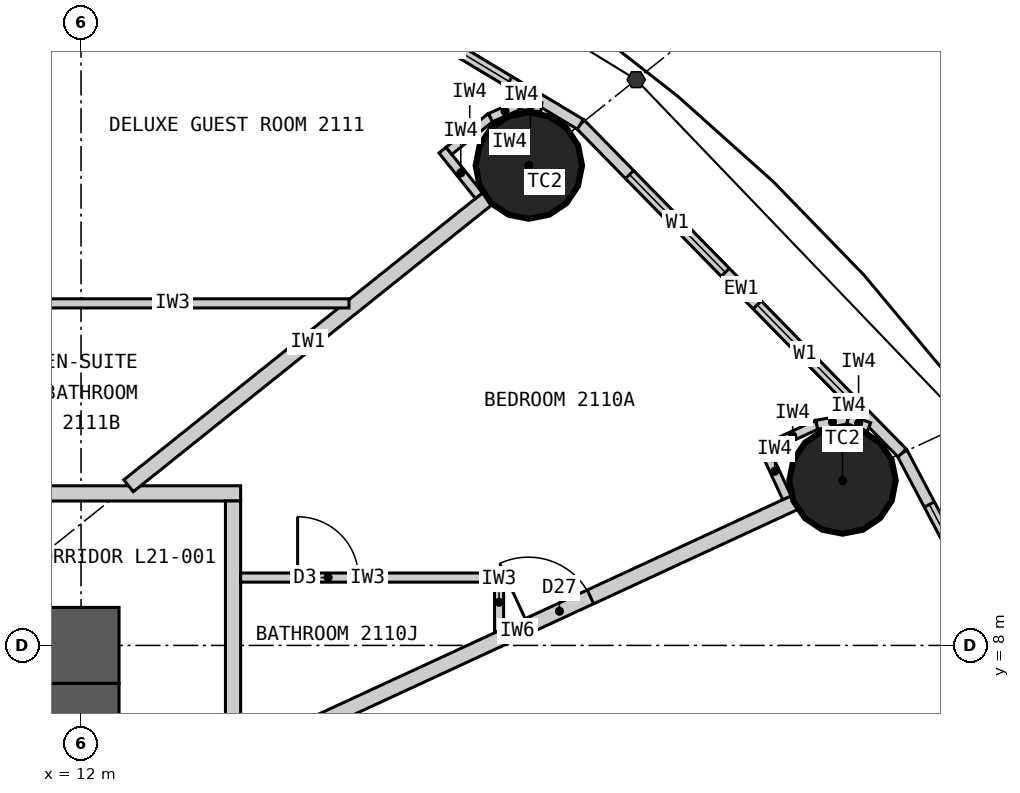
"""IFC4 building model, lengths in metres.
Left out: names, types, materials, properties, quantities, classifications, styles, units other than length and angle.
Written with IfcOpenShell. Run it as: python <this file> out.ifc"""

import sys

from ifc_helpers import new_model, si_unit, direction, frame, frame_2d, origin, origin_2d, place, context, subcontext, project, spatial, rectangle, circle, extrude, element, fill, save


model = new_model("IFC4")
c1 = context("Model", 3, precision=1e-05, world=origin(), true_north=direction((0.0, 1.0)))
c2 = subcontext(c1, "Body", "Model", "MODEL_VIEW")
j1 = project(units=[si_unit("LENGTHUNIT", "METRE"), si_unit("PLANEANGLEUNIT", "RADIAN")], contexts=[c1])
p1 = place(None, origin())
s1 = spatial("IfcSite", under=j1, at=p1, CompositionType="ELEMENT")
p2 = place(p1, origin())
s2 = spatial("IfcBuilding", under=s1, at=p2, CompositionType="ELEMENT")
p3 = place(p2, frame((0.0, 0.0, 83.7)))
s3 = spatial("IfcBuildingStorey", under=s2, at=p3, CompositionType="ELEMENT", Elevation=83.7)
for number, where, z_axis, x_axis in (
    (1, (22.019, 10.17, 0.0), (0.0, 0.0, 1.0), (1.0, 0.0, 0.0)),
    (2, (17.892, 14.313, 0.0), (0.0, 0.0, 1.0), (1.0, 0.0, 0.0)),
):
    element("IfcColumn", number, at=place(p3, frame(where, z_axis=z_axis, x_axis=x_axis)), inside=s3, PredefinedType="COLUMN", context=c2, shape_type="SweptSolid", body=[
        extrude(circle(Radius=0.7, at=origin_2d()), origin(), (0.0, 0.0, 1.0), 3.3),
    ])
p4 = place(p3, frame((-12.5, 8.0, 0.0), z_axis=(0.0, 0.0, 1.0), x_axis=(1.0, 0.0, 0.0)))
e3 = element("IfcWall", 3, at=p4, inside=s3, PredefinedType="SHEAR", context=c2, shape_type="SweptSolid", body=[
    extrude(rectangle(XDim=25.0, YDim=1.0, at=frame_2d((12.5, 0.0))), origin(), (0.0, 0.0, 1.0), 3.3),
])
p5 = place(p4, frame((11.2, 0.0, 0.0)))
e4 = element("IfcOpeningElement", 4, at=p5, cuts=e3, PredefinedType="OPENING", context=c2, shape_type="SweptSolid", body=[
    extrude(rectangle(XDim=1.2, YDim=2.2, at=frame_2d((0.6, 1.1))), frame((0.0, 0.51, 0.0), z_axis=(0.0, -1.0, 0.0), x_axis=(1.0, 0.0, 0.0)), (0.0, 0.0, 1.0), 1.02),
])
p6 = place(p4, frame((18.8, 0.0, 0.0)))
e5 = element("IfcOpeningElement", 5, at=p6, cuts=e3, PredefinedType="OPENING", context=c2, shape_type="SweptSolid", body=[
    extrude(rectangle(XDim=0.9, YDim=2.2, at=frame_2d((0.45, 1.1))), frame((0.0, 0.51, 0.0), z_axis=(0.0, -1.0, 0.0), x_axis=(1.0, 0.0, 0.0)), (0.0, 0.0, 1.0), 1.02),
])
p7 = place(p3, frame((12.0, -7.5, 0.0), z_axis=(0.0, 0.0, 1.0), x_axis=(0.0, 1.0, 0.0)))
e6 = element("IfcWall", 6, at=p7, inside=s3, PredefinedType="SHEAR", context=c2, shape_type="SweptSolid", body=[
    extrude(rectangle(XDim=15.0, YDim=1.0, at=frame_2d((7.5, 0.0))), origin(), (0.0, 0.0, 1.0), 3.3),
])
p8 = place(p7, frame((6.6, 0.0, 0.0)))
e7 = element("IfcOpeningElement", 7, at=p8, cuts=e6, PredefinedType="OPENING", context=c2, shape_type="SweptSolid", body=[
    extrude(rectangle(XDim=1.8, YDim=2.2, at=frame_2d((0.9, 1.1))), frame((0.0, 0.51, 0.0), z_axis=(0.0, -1.0, 0.0), x_axis=(1.0, 0.0, 0.0)), (0.0, 0.0, 1.0), 1.02),
])
p9 = place(p3, frame((25.482, 5.462, 0.0), z_axis=(0.0, 0.0, 1.0), x_axis=(-0.467296867008, 0.884100468321, 0.0)))
e8 = element("IfcWall", 8, at=p9, inside=s3, PredefinedType="ELEMENTEDWALL", context=c2, shape_type="SweptSolid", body=[
    extrude(rectangle(XDim=5.734, YDim=0.15, at=frame_2d((2.867, 0.0))), origin(), (0.0, 0.0, 1.0), 3.12),
])
p10 = place(p9, frame((0.767, 0.0, 0.9)))
e9 = element("IfcOpeningElement", 9, at=p10, cuts=e8, PredefinedType="OPENING", context=c2, shape_type="SweptSolid", body=[
    extrude(rectangle(XDim=1.8, YDim=1.9, at=frame_2d((0.9, 0.95))), frame((0.0, 0.085, 0.0), z_axis=(0.0, -1.0, 0.0), x_axis=(1.0, 0.0, 0.0)), (0.0, 0.0, 1.0), 0.17),
])
p11 = place(p9, frame((3.167, 0.0, 0.9)))
e10 = element("IfcOpeningElement", 10, at=p11, cuts=e8, PredefinedType="OPENING", context=c2, shape_type="SweptSolid", body=[
    extrude(rectangle(XDim=1.8, YDim=1.9, at=frame_2d((0.9, 0.95))), frame((0.0, 0.085, 0.0), z_axis=(0.0, -1.0, 0.0), x_axis=(1.0, 0.0, 0.0)), (0.0, 0.0, 1.0), 0.17),
])
p12 = place(p3, frame((22.803, 10.532, 0.0), z_axis=(0.0, 0.0, 1.0), x_axis=(-0.699602905915, 0.714531856557, 0.0)))
e11 = element("IfcWall", 11, at=p12, inside=s3, PredefinedType="ELEMENTEDWALL", context=c2, shape_type="SweptSolid", body=[
    extrude(rectangle(XDim=6.051, YDim=0.15, at=frame_2d((3.025, 0.0))), origin(), (0.0, 0.0, 1.0), 3.12),
])
p13 = place(p12, frame((0.926, 0.0, 0.9)))
e12 = element("IfcOpeningElement", 12, at=p13, cuts=e11, PredefinedType="OPENING", context=c2, shape_type="SweptSolid", body=[
    extrude(rectangle(XDim=1.8, YDim=1.9, at=frame_2d((0.9, 0.95))), frame((0.0, 0.085, 0.0), z_axis=(0.0, -1.0, 0.0), x_axis=(1.0, 0.0, 0.0)), (0.0, 0.0, 1.0), 0.17),
])
p14 = place(p12, frame((3.325, 0.0, 0.9)))
e13 = element("IfcOpeningElement", 13, at=p14, cuts=e11, PredefinedType="OPENING", context=c2, shape_type="SweptSolid", body=[
    extrude(rectangle(XDim=1.8, YDim=1.9, at=frame_2d((0.9, 0.95))), frame((0.0, 0.085, 0.0), z_axis=(0.0, -1.0, 0.0), x_axis=(1.0, 0.0, 0.0)), (0.0, 0.0, 1.0), 0.17),
])
p15 = place(p3, frame((18.57, 14.856, 0.0), z_axis=(0.0, 0.0, 1.0), x_axis=(-0.856983180864, 0.515344377787, 0.0)))
e14 = element("IfcWall", 14, at=p15, inside=s3, PredefinedType="ELEMENTEDWALL", context=c2, shape_type="SweptSolid", body=[
    extrude(rectangle(XDim=6.386, YDim=0.15, at=frame_2d((3.193, 0.0))), origin(), (0.0, 0.0, 1.0), 3.12),
])
p16 = place(p15, frame((1.093, 0.0, 0.9)))
e15 = element("IfcOpeningElement", 15, at=p16, cuts=e14, PredefinedType="OPENING", context=c2, shape_type="SweptSolid", body=[
    extrude(rectangle(XDim=1.8, YDim=1.9, at=frame_2d((0.9, 0.95))), frame((0.0, 0.085, 0.0), z_axis=(0.0, -1.0, 0.0), x_axis=(1.0, 0.0, 0.0)), (0.0, 0.0, 1.0), 0.17),
])
p17 = place(p15, frame((3.493, 0.0, 0.9)))
e16 = element("IfcOpeningElement", 16, at=p17, cuts=e14, PredefinedType="OPENING", context=c2, shape_type="SweptSolid", body=[
    extrude(rectangle(XDim=1.8, YDim=1.9, at=frame_2d((0.9, 0.95))), frame((0.0, 0.085, 0.0), z_axis=(0.0, -1.0, 0.0), x_axis=(1.0, 0.0, 0.0)), (0.0, 0.0, 1.0), 0.17),
])
p18 = place(p3, frame((-14.1, 10.0, 0.0), z_axis=(0.0, 0.0, 1.0), x_axis=(1.0, 0.0, 0.0)))
e17 = element("IfcWall", 17, at=p18, inside=s3, PredefinedType="PARTITIONING", context=c2, shape_type="SweptSolid", body=[
    extrude(rectangle(XDim=28.2, YDim=0.2, at=frame_2d((14.1, 0.0))), origin(), (0.0, 0.0, 1.0), 3.12),
])
p19 = place(p18, frame((23.865, 0.0, 0.0)))
e18 = element("IfcOpeningElement", 18, at=p19, cuts=e17, PredefinedType="OPENING", context=c2, shape_type="SweptSolid", body=[
    extrude(rectangle(XDim=1.0, YDim=2.2, at=frame_2d((0.5, 1.1))), frame((0.0, 0.11, 0.0), z_axis=(0.0, -1.0, 0.0), x_axis=(1.0, 0.0, 0.0)), (0.0, 0.0, 1.0), 0.22),
])
p20 = place(p18, frame((18.529, 0.0, 0.0)))
e19 = element("IfcOpeningElement", 19, at=p20, cuts=e17, PredefinedType="OPENING", context=c2, shape_type="SweptSolid", body=[
    extrude(rectangle(XDim=1.0, YDim=2.2, at=frame_2d((0.5, 1.1))), frame((0.0, 0.11, 0.0), z_axis=(0.0, -1.0, 0.0), x_axis=(1.0, 0.0, 0.0)), (0.0, 0.0, 1.0), 0.22),
])
p21 = place(p18, frame((14.623, 0.0, 0.0)))
e20 = element("IfcOpeningElement", 20, at=p21, cuts=e17, PredefinedType="OPENING", context=c2, shape_type="SweptSolid", body=[
    extrude(rectangle(XDim=1.0, YDim=2.2, at=frame_2d((0.5, 1.1))), frame((0.0, 0.11, 0.0), z_axis=(0.0, -1.0, 0.0), x_axis=(1.0, 0.0, 0.0)), (0.0, 0.0, 1.0), 0.22),
])
p22 = place(p18, frame((11.24, 0.0, 0.0)))
e21 = element("IfcOpeningElement", 21, at=p22, cuts=e17, PredefinedType="OPENING", context=c2, shape_type="SweptSolid", body=[
    extrude(rectangle(XDim=1.0, YDim=2.2, at=frame_2d((0.5, 1.1))), frame((0.0, 0.11, 0.0), z_axis=(0.0, -1.0, 0.0), x_axis=(1.0, 0.0, 0.0)), (0.0, 0.0, 1.0), 0.22),
])
p23 = place(p18, frame((8.671, 0.0, 0.0)))
e22 = element("IfcOpeningElement", 22, at=p23, cuts=e17, PredefinedType="OPENING", context=c2, shape_type="SweptSolid", body=[
    extrude(rectangle(XDim=1.0, YDim=2.2, at=frame_2d((0.5, 1.1))), frame((0.0, 0.11, 0.0), z_axis=(0.0, -1.0, 0.0), x_axis=(1.0, 0.0, 0.0)), (0.0, 0.0, 1.0), 0.22),
])
p24 = place(p18, frame((2.801, 0.0, 0.0)))
e23 = element("IfcOpeningElement", 23, at=p24, cuts=e17, PredefinedType="OPENING", context=c2, shape_type="SweptSolid", body=[
    extrude(rectangle(XDim=1.0, YDim=2.2, at=frame_2d((0.5, 1.1))), frame((0.0, 0.11, 0.0), z_axis=(0.0, -1.0, 0.0), x_axis=(1.0, 0.0, 0.0)), (0.0, 0.0, 1.0), 0.22),
])
p25 = place(p3, frame((14.0, -9.9, 0.0), z_axis=(0.0, 0.0, 1.0), x_axis=(0.0, 1.0, 0.0)))
e24 = element("IfcWall", 24, at=p25, inside=s3, PredefinedType="PARTITIONING", context=c2, shape_type="SweptSolid", body=[
    extrude(rectangle(XDim=19.8, YDim=0.2, at=frame_2d((9.9, 0.0))), origin(), (0.0, 0.0, 1.0), 3.12),
])
p26 = place(p25, frame((5.948, 0.0, 0.0)))
e25 = element("IfcOpeningElement", 25, at=p26, cuts=e24, PredefinedType="OPENING", context=c2, shape_type="SweptSolid", body=[
    extrude(rectangle(XDim=1.0, YDim=2.2, at=frame_2d((0.5, 1.1))), frame((0.0, 0.11, 0.0), z_axis=(0.0, -1.0, 0.0), x_axis=(1.0, 0.0, 0.0)), (0.0, 0.0, 1.0), 0.22),
])
p27 = place(p25, frame((11.46, 0.0, 0.0)))
e26 = element("IfcOpeningElement", 26, at=p27, cuts=e24, PredefinedType="OPENING", context=c2, shape_type="SweptSolid", body=[
    extrude(rectangle(XDim=1.0, YDim=2.2, at=frame_2d((0.5, 1.1))), frame((0.0, 0.11, 0.0), z_axis=(0.0, -1.0, 0.0), x_axis=(1.0, 0.0, 0.0)), (0.0, 0.0, 1.0), 0.22),
])
p28 = place(p3, frame((14.1, 6.512, 0.0), z_axis=(0.0, 0.0, 1.0), x_axis=(0.907832871056, 0.419332181247, 0.0)))
e27 = element("IfcWall", 27, at=p28, inside=s3, PredefinedType="PARTITIONING", context=c2, shape_type="SweptSolid", body=[
    extrude(rectangle(XDim=8.023, YDim=0.2, at=frame_2d((4.011, 0.0))), origin(), (0.0, 0.0, 1.0), 2.32),
])
p29 = place(p28, frame((4.17, 0.0, 0.0)))
e28 = element("IfcOpeningElement", 28, at=p29, cuts=e27, PredefinedType="OPENING", context=c2, shape_type="SweptSolid", body=[
    extrude(rectangle(XDim=0.9, YDim=2.1, at=frame_2d((0.45, 1.05))), frame((0.0, 0.11, 0.0), z_axis=(0.0, -1.0, 0.0), x_axis=(1.0, 0.0, 0.0)), (0.0, 0.0, 1.0), 0.22),
])
p30 = place(p3, frame((12.625, 10.1, 0.0), z_axis=(0.0, 0.0, 1.0), x_axis=(0.780892451574, 0.624665493744, 0.0)))
e29 = element("IfcWall", 29, at=p30, inside=s3, PredefinedType="PARTITIONING", context=c2, shape_type="SweptSolid", body=[
    extrude(rectangle(XDim=6.045, YDim=0.2, at=frame_2d((3.022, 0.0))), origin(), (0.0, 0.0, 1.0), 2.32),
])
p31 = place(p3, frame((7.289, 10.1, 0.0), z_axis=(0.0, 0.0, 1.0), x_axis=(0.585198353053, 0.810890182197, 0.0)))
e30 = element("IfcWall", 30, at=p31, inside=s3, PredefinedType="PARTITIONING", context=c2, shape_type="SweptSolid", body=[
    extrude(rectangle(XDim=8.36, YDim=0.2, at=frame_2d((4.18, 0.0))), origin(), (0.0, 0.0, 1.0), 2.32),
])
p32 = place(p3, frame((17.5, 8.183, 0.0), z_axis=(0.0, 0.0, 1.0), x_axis=(0.0, 1.0, 0.0)))
e31 = element("IfcWall", 31, at=p32, inside=s3, PredefinedType="PARTITIONING", context=c2, shape_type="SweptSolid", body=[
    extrude(rectangle(XDim=0.77, YDim=0.12, at=frame_2d((0.385, 0.0))), origin(), (0.0, 0.0, 1.0), 3.12),
])
p33 = place(p3, frame((14.1, 8.893, 0.0), z_axis=(0.0, 0.0, 1.0), x_axis=(1.0, 0.0, 0.0)))
e32 = element("IfcWall", 32, at=p33, inside=s3, PredefinedType="PARTITIONING", context=c2, shape_type="SweptSolid", body=[
    extrude(rectangle(XDim=3.34, YDim=0.12, at=frame_2d((1.67, 0.0))), origin(), (0.0, 0.0, 1.0), 3.12),
])
p34 = place(p33, frame((0.75, 0.0, 0.0)))
e33 = element("IfcOpeningElement", 33, at=p34, cuts=e32, PredefinedType="OPENING", context=c2, shape_type="SweptSolid", body=[
    extrude(rectangle(XDim=0.8, YDim=2.1, at=frame_2d((0.4, 1.05))), frame((0.0, 0.07, 0.0), z_axis=(0.0, -1.0, 0.0), x_axis=(1.0, 0.0, 0.0)), (0.0, 0.0, 1.0), 0.14),
])
p35 = place(p3, frame((15.525, 12.5, 0.0), z_axis=(0.0, 0.0, 1.0), x_axis=(-1.0, 0.0, 0.0)))
e34 = element("IfcWall", 34, at=p35, inside=s3, PredefinedType="PARTITIONING", context=c2, shape_type="SweptSolid", body=[
    extrude(rectangle(XDim=4.64, YDim=0.12, at=frame_2d((2.32, 0.0))), origin(), (0.0, 0.0, 1.0), 3.12),
])
p36 = place(p3, frame((21.287, 9.942, 0.0), z_axis=(0.0, 0.0, 1.0), x_axis=(-0.419259891039, 0.907866258744, 0.0)))
e35 = element("IfcWall", 35, at=p36, inside=s3, PredefinedType="PARTITIONING", context=c2, shape_type="SweptSolid", body=[
    extrude(rectangle(XDim=0.768, YDim=0.12, at=frame_2d((0.384, 0.0))), origin(), (0.0, 0.0, 1.0), 3.12),
])
p37 = place(p3, frame((21.045, 10.61, 0.0), z_axis=(0.0, 0.0, 1.0), x_axis=(0.907877701396, 0.419235112208, 0.0)))
e36 = element("IfcWall", 36, at=p37, inside=s3, PredefinedType="PARTITIONING", context=c2, shape_type="SweptSolid", body=[
    extrude(rectangle(XDim=0.7, YDim=0.12, at=frame_2d((0.35, 0.0))), origin(), (0.0, 0.0, 1.0), 3.12),
])
p38 = place(p3, frame((21.68, 10.903, 0.0), z_axis=(0.0, 0.0, 1.0), x_axis=(0.985446622073, 0.169985161247, 0.0)))
e37 = element("IfcWall", 37, at=p38, inside=s3, PredefinedType="PARTITIONING", context=c2, shape_type="SweptSolid", body=[
    extrude(rectangle(XDim=0.418, YDim=0.12, at=frame_2d((0.209, 0.0))), origin(), (0.0, 0.0, 1.0), 3.12),
])
p39 = place(p3, frame((22.092, 10.974, 0.0), z_axis=(0.0, 0.0, 1.0), x_axis=(0.938428160676, -0.345474437912, 0.0)))
e38 = element("IfcWall", 38, at=p39, inside=s3, PredefinedType="PARTITIONING", context=c2, shape_type="SweptSolid", body=[
    extrude(rectangle(XDim=0.294, YDim=0.12, at=frame_2d((0.147, 0.0))), origin(), (0.0, 0.0, 1.0), 3.12),
])
p40 = place(p3, frame((17.236, 13.917, 0.0), z_axis=(0.0, 0.0, 1.0), x_axis=(-0.624695047554, 0.780868809443, 0.0)))
e39 = element("IfcWall", 39, at=p40, inside=s3, PredefinedType="PARTITIONING", context=c2, shape_type="SweptSolid", body=[
    extrude(rectangle(XDim=0.768, YDim=0.12, at=frame_2d((0.384, 0.0))), origin(), (0.0, 0.0, 1.0), 3.12),
])
p41 = place(p3, frame((16.841, 14.507, 0.0), z_axis=(0.0, 0.0, 1.0), x_axis=(0.780902834923, 0.62465251333, 0.0)))
e40 = element("IfcWall", 40, at=p41, inside=s3, PredefinedType="PARTITIONING", context=c2, shape_type="SweptSolid", body=[
    extrude(rectangle(XDim=0.7, YDim=0.12, at=frame_2d((0.35, 0.0))), origin(), (0.0, 0.0, 1.0), 3.12),
])
p42 = place(p3, frame((17.387, 14.944, 0.0), z_axis=(0.0, 0.0, 1.0), x_axis=(0.916036698064, 0.401094462441, 0.0)))
e41 = element("IfcWall", 41, at=p42, inside=s3, PredefinedType="PARTITIONING", context=c2, shape_type="SweptSolid", body=[
    extrude(rectangle(XDim=0.418, YDim=0.12, at=frame_2d((0.209, 0.0))), origin(), (0.0, 0.0, 1.0), 3.12),
])
p43 = place(p3, frame((17.77, 15.112, 0.0), z_axis=(0.0, 0.0, 1.0), x_axis=(0.993904401174, -0.110245368731, 0.0)))
e42 = element("IfcWall", 42, at=p43, inside=s3, PredefinedType="PARTITIONING", context=c2, shape_type="SweptSolid", body=[
    extrude(rectangle(XDim=0.288, YDim=0.12, at=frame_2d((0.144, 0.0))), origin(), (0.0, 0.0, 1.0), 3.12),
])
p44 = place(p11, origin())
e43 = element("IfcWindow", 43, at=p44, inside=s3, PartitioningType="SINGLE_PANEL", PredefinedType="WINDOW", context=c2, shape_type="SweptSolid", body=[
    extrude(rectangle(XDim=1.8, YDim=1.9, at=frame_2d((0.9, 0.95))), frame((0.0, 0.03, 0.0), z_axis=(0.0, -1.0, 0.0), x_axis=(1.0, 0.0, 0.0)), (0.0, 0.0, 1.0), 0.06),
])
fill(e10, e43)
p45 = place(p13, origin())
e44 = element("IfcWindow", 44, at=p45, inside=s3, PartitioningType="SINGLE_PANEL", PredefinedType="WINDOW", context=c2, shape_type="SweptSolid", body=[
    extrude(rectangle(XDim=1.8, YDim=1.9, at=frame_2d((0.9, 0.95))), frame((0.0, 0.03, 0.0), z_axis=(0.0, -1.0, 0.0), x_axis=(1.0, 0.0, 0.0)), (0.0, 0.0, 1.0), 0.06),
])
fill(e12, e44)
p46 = place(p14, origin())
e45 = element("IfcWindow", 45, at=p46, inside=s3, PartitioningType="SINGLE_PANEL", PredefinedType="WINDOW", context=c2, shape_type="SweptSolid", body=[
    extrude(rectangle(XDim=1.8, YDim=1.9, at=frame_2d((0.9, 0.95))), frame((0.0, 0.03, 0.0), z_axis=(0.0, -1.0, 0.0), x_axis=(1.0, 0.0, 0.0)), (0.0, 0.0, 1.0), 0.06),
])
fill(e13, e45)
p47 = place(p16, origin())
e46 = element("IfcWindow", 46, at=p47, inside=s3, PartitioningType="SINGLE_PANEL", PredefinedType="WINDOW", context=c2, shape_type="SweptSolid", body=[
    extrude(rectangle(XDim=1.8, YDim=1.9, at=frame_2d((0.9, 0.95))), frame((0.0, 0.03, 0.0), z_axis=(0.0, -1.0, 0.0), x_axis=(1.0, 0.0, 0.0)), (0.0, 0.0, 1.0), 0.06),
])
fill(e15, e46)
p48 = place(p34, origin())
e47 = element("IfcDoor", 47, at=p48, inside=s3, OperationType="SINGLE_SWING_LEFT", PredefinedType="DOOR", context=c2, shape_type="SweptSolid", body=[
    extrude(rectangle(XDim=0.8, YDim=2.1, at=frame_2d((0.4, 1.05))), frame((0.0, 0.025, 0.0), z_axis=(0.0, -1.0, 0.0), x_axis=(1.0, 0.0, 0.0)), (0.0, 0.0, 1.0), 0.05),
])
fill(e33, e47)
p49 = place(p29, origin())
e48 = element("IfcDoor", 48, at=p49, inside=s3, OperationType="SINGLE_SWING_LEFT", PredefinedType="DOOR", context=c2, shape_type="SweptSolid", body=[
    extrude(rectangle(XDim=0.9, YDim=2.1, at=frame_2d((0.45, 1.05))), frame((0.0, 0.025, 0.0), z_axis=(0.0, -1.0, 0.0), x_axis=(1.0, 0.0, 0.0)), (0.0, 0.0, 1.0), 0.05),
])
fill(e28, e48)
save(model, sys.argv[1])
